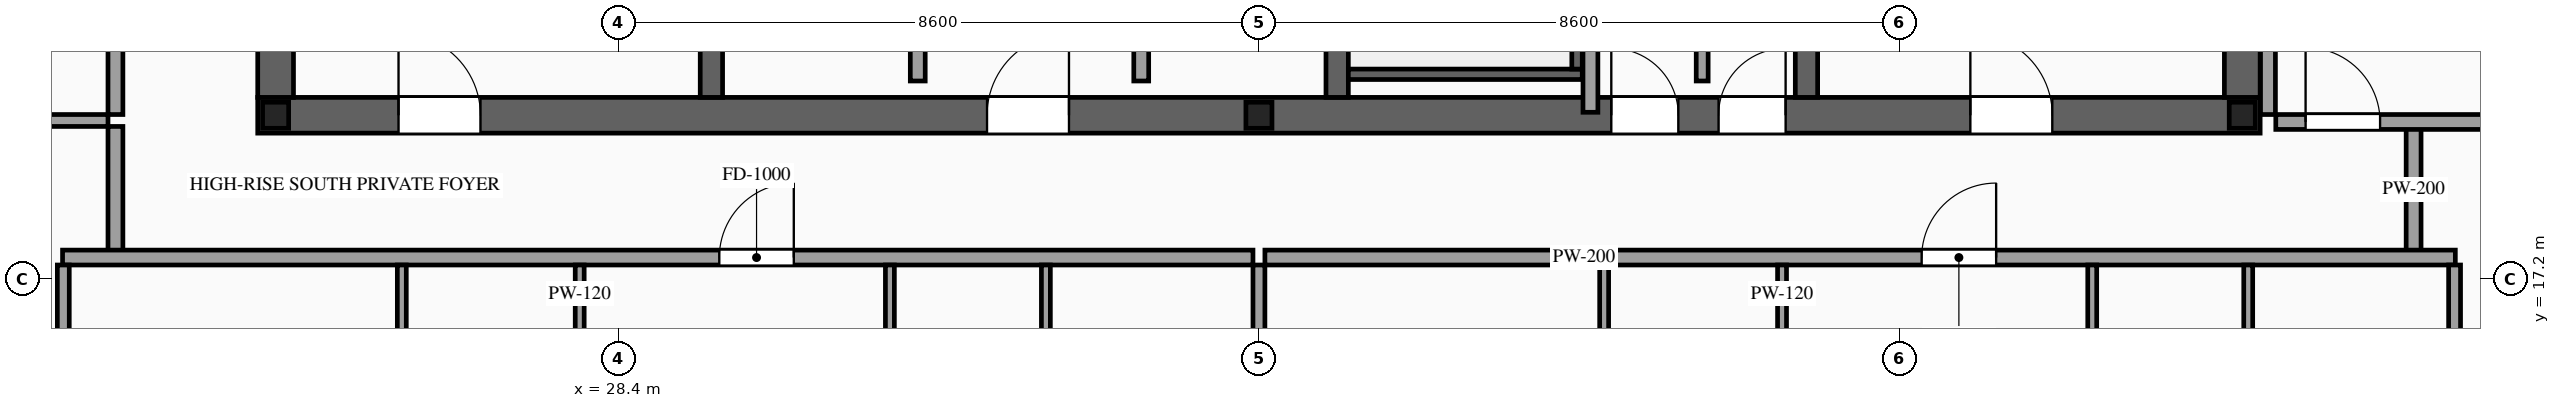
"""IFC4 building model, lengths in metres.
Left out: names, types, materials, properties, quantities, classifications, styles, units other than length and angle.
Written with IfcOpenShell. Run it as: python <this file> out.ifc"""

import sys

from ifc_helpers import new_model, si_unit, direction, frame, frame_2d, origin, origin_2d, place, context, subcontext, project, spatial, rectangle, i_section, extrude, source, transform, mapped, element, fill, save


model = new_model("IFC4")
c1 = context("Model", 3, precision=1e-05, world=origin(), true_north=direction((0.0, 1.0)))
c2 = subcontext(c1, "Body", "Model", "MODEL_VIEW")
j1 = project(units=[si_unit("LENGTHUNIT", "METRE"), si_unit("PLANEANGLEUNIT", "RADIAN")], contexts=[c1])
p1 = place(None, origin())
s1 = spatial("IfcSite", under=j1, at=p1, CompositionType="ELEMENT")
p2 = place(p1, origin())
s2 = spatial("IfcBuilding", under=s1, at=p2, CompositionType="ELEMENT")
p3 = place(p2, frame((0.0, 0.0, 325.2)))
s3 = spatial("IfcBuildingStorey", under=s2, at=p3, CompositionType="ELEMENT", Elevation=325.2)
p4 = place(p3, frame((23.56, 19.4, 0.0), z_axis=(0.0, 0.0, 1.0), x_axis=(1.0, 0.0, 0.0)))
e1 = element("IfcWall", 1, at=p4, inside=s3, PredefinedType="SHEAR", context=c2, shape_type="SweptSolid", body=[
    extrude(rectangle(XDim=26.88, YDim=0.48, at=frame_2d((13.44, 0.0))), origin(), (0.0, 0.0, 1.0), 3.5),
])
p5 = place(p4, frame((1.89, 0.0, 0.0)))
e2 = element("IfcOpeningElement", 2, at=p5, cuts=e1, PredefinedType="OPENING", context=c2, shape_type="SweptSolid", body=[
    extrude(rectangle(XDim=1.1, YDim=2.2, at=frame_2d((0.55, 1.1))), frame((0.0, 0.255, 0.0), z_axis=(0.0, -1.0, 0.0), x_axis=(1.0, 0.0, 0.0)), (0.0, 0.0, 1.0), 0.51),
])
p6 = place(p4, frame((9.79, 0.0, 0.0)))
e3 = element("IfcOpeningElement", 3, at=p6, cuts=e1, PredefinedType="OPENING", context=c2, shape_type="SweptSolid", body=[
    extrude(rectangle(XDim=1.1, YDim=2.2, at=frame_2d((0.55, 1.1))), frame((0.0, 0.255, 0.0), z_axis=(0.0, -1.0, 0.0), x_axis=(1.0, 0.0, 0.0)), (0.0, 0.0, 1.0), 0.51),
])
p7 = place(p4, frame((22.99, 0.0, 0.0)))
e4 = element("IfcOpeningElement", 4, at=p7, cuts=e1, PredefinedType="OPENING", context=c2, shape_type="SweptSolid", body=[
    extrude(rectangle(XDim=1.1, YDim=2.2, at=frame_2d((0.55, 1.1))), frame((0.0, 0.255, 0.0), z_axis=(0.0, -1.0, 0.0), x_axis=(1.0, 0.0, 0.0)), (0.0, 0.0, 1.0), 0.51),
])
p8 = place(p4, frame((19.61, 0.0, 0.0)))
e5 = element("IfcOpeningElement", 5, at=p8, cuts=e1, PredefinedType="OPENING", context=c2, shape_type="SweptSolid", body=[
    extrude(rectangle(XDim=0.9, YDim=2.15, at=frame_2d((0.45, 1.075))), frame((0.0, 0.255, 0.0), z_axis=(0.0, -1.0, 0.0), x_axis=(1.0, 0.0, 0.0)), (0.0, 0.0, 1.0), 0.51),
])
p9 = place(p4, frame((18.17, 0.0, 0.0)))
e6 = element("IfcOpeningElement", 6, at=p9, cuts=e1, PredefinedType="OPENING", context=c2, shape_type="SweptSolid", body=[
    extrude(rectangle(XDim=0.9, YDim=2.15, at=frame_2d((0.45, 1.075))), frame((0.0, 0.255, 0.0), z_axis=(0.0, -1.0, 0.0), x_axis=(1.0, 0.0, 0.0)), (0.0, 0.0, 1.0), 0.51),
])
m1 = source(origin(), c2, "Body", "SweptSolid", [
    extrude(rectangle(XDim=12.32, YDim=0.48, at=frame_2d((6.16, 0.0))), origin(), (0.0, 0.0, 1.0), 3.5),
])
for number, where, z_axis, x_axis in (
    (7, (23.8, 19.64, 0.0), (0.0, 0.0, 1.0), (0.0, 1.0, 0.0)),
    (8, (50.2, 19.64, 0.0), (0.0, 0.0, 1.0), (0.0, 1.0, 0.0)),
):
    element("IfcWall", number, at=place(p3, frame(where, z_axis=z_axis, x_axis=x_axis)), inside=s3, PredefinedType="SHEAR", context=c2, shape_type="MappedRepresentation", body=[
        mapped(m1, transform((0.0, 0.0, 0.0), scale=1.0)),
    ])
m2 = source(origin(), c2, "Body", "SweptSolid", [
    extrude(rectangle(XDim=12.32, YDim=0.3, at=frame_2d((6.16, 0.0))), origin(), (0.0, 0.0, 1.0), 3.5),
])
for number, where, z_axis, x_axis in (
    (9, (29.65, 19.64, 0.0), (0.0, 0.0, 1.0), (0.0, 1.0, 0.0)),
    (10, (38.05, 19.64, 0.0), (0.0, 0.0, 1.0), (0.0, 1.0, 0.0)),
):
    element("IfcWall", number, at=place(p3, frame(where, z_axis=z_axis, x_axis=x_axis)), inside=s3, PredefinedType="SOLIDWALL", context=c2, shape_type="MappedRepresentation", body=[
        mapped(m2, transform((0.0, 0.0, 0.0), scale=1.0)),
    ])
p10 = place(p3, frame((44.35, 19.64, 0.0), z_axis=(0.0, 0.0, 1.0), x_axis=(0.0, 1.0, 0.0)))
e11 = element("IfcWall", 11, at=p10, inside=s3, PredefinedType="SOLIDWALL", context=c2, shape_type="SweptSolid", body=[
    extrude(rectangle(XDim=12.32, YDim=0.3, at=frame_2d((6.16, 0.0))), origin(), (0.0, 0.0, 1.0), 3.5),
])
p11 = place(p10, frame((6.56, 0.0, 0.0)))
e12 = element("IfcOpeningElement", 12, at=p11, cuts=e11, PredefinedType="OPENING", context=c2, shape_type="SweptSolid", body=[
    extrude(rectangle(XDim=1.1, YDim=2.2, at=frame_2d((0.55, 1.1))), frame((0.0, 0.165, 0.0), z_axis=(0.0, -1.0, 0.0), x_axis=(1.0, 0.0, 0.0)), (0.0, 0.0, 1.0), 0.33),
])
p12 = place(p10, frame((8.66, 0.0, 0.0)))
e13 = element("IfcOpeningElement", 13, at=p12, cuts=e11, PredefinedType="OPENING", context=c2, shape_type="SweptSolid", body=[
    extrude(rectangle(XDim=1.1, YDim=2.2, at=frame_2d((0.55, 1.1))), frame((0.0, 0.165, 0.0), z_axis=(0.0, -1.0, 0.0), x_axis=(1.0, 0.0, 0.0)), (0.0, 0.0, 1.0), 0.33),
])
p13 = place(p10, frame((10.76, 0.0, 0.0)))
e14 = element("IfcOpeningElement", 14, at=p13, cuts=e11, PredefinedType="OPENING", context=c2, shape_type="SweptSolid", body=[
    extrude(rectangle(XDim=1.1, YDim=2.2, at=frame_2d((0.55, 1.1))), frame((0.0, 0.165, 0.0), z_axis=(0.0, -1.0, 0.0), x_axis=(1.0, 0.0, 0.0)), (0.0, 0.0, 1.0), 0.33),
])
m3 = source(origin(), c2, "Body", "SweptSolid", [
    extrude(i_section(OverallWidth=0.35, OverallDepth=0.35, WebThickness=0.012, FlangeThickness=0.019, at=origin_2d()), origin(), (0.0, 0.0, 1.0), 3.5),
])
for number, where, z_axis, x_axis in (
    (15, (23.8, 19.4, 0.0), (0.0, 0.0, 1.0), (1.0, 0.0, 0.0)),
    (16, (37.0, 19.4, 0.0), (0.0, 0.0, 1.0), (1.0, 0.0, 0.0)),
    (17, (50.2, 19.4, 0.0), (0.0, 0.0, 1.0), (1.0, 0.0, 0.0)),
):
    element("IfcColumn", number, at=place(p3, frame(where, z_axis=z_axis, x_axis=x_axis)), inside=s3, PredefinedType="COLUMN", context=c2, shape_type="MappedRepresentation", body=[
        mapped(m3, transform((0.0, 0.0, 0.0), scale=1.0)),
    ])
m4 = source(origin(), c2, "Body", "SweptSolid", [
    extrude(rectangle(XDim=3.14, YDim=0.14, at=frame_2d((1.57, 0.0))), origin(), (0.0, 0.0, 1.0), 3.28),
])
p14 = place(p3, frame((38.2, 19.95, 0.0), z_axis=(0.0, 0.0, 1.0), x_axis=(1.0, 0.0, 0.0)))
e18 = element("IfcWall", 18, at=p14, inside=s3, PredefinedType="SOLIDWALL", context=c2, shape_type="MappedRepresentation", body=[
    mapped(m4, transform((0.0, 0.0, 0.0), scale=1.0)),
])
m5 = source(origin(), c2, "Body", "SweptSolid", [
    extrude(rectangle(XDim=8.94, YDim=0.14, at=frame_2d((4.47, 0.0))), origin(), (0.0, 0.0, 1.0), 3.28),
])
p15 = place(p3, frame((41.27, 20.02, 0.0), z_axis=(0.0, 0.0, 1.0), x_axis=(0.0, 1.0, 0.0)))
e19 = element("IfcWall", 19, at=p15, inside=s3, PredefinedType="SOLIDWALL", context=c2, shape_type="MappedRepresentation", body=[
    mapped(m5, transform((0.0, 0.0, 0.0), scale=1.0)),
])
p16 = place(p3, frame((32.42, 19.86, 0.0), z_axis=(0.0, 0.0, 1.0), x_axis=(0.0, 1.0, 0.0)))
e20 = element("IfcWall", 20, at=p16, inside=s3, PredefinedType="PARTITIONING", context=c2, shape_type="SweptSolid", body=[
    extrude(rectangle(XDim=11.88, YDim=0.2, at=frame_2d((5.94, 0.0))), origin(), (0.0, 0.0, 1.0), 3.28),
])
p17 = place(p16, frame((5.49, 0.0, 0.0)))
e21 = element("IfcOpeningElement", 21, at=p17, cuts=e20, PredefinedType="OPENING", context=c2, shape_type="SweptSolid", body=[
    extrude(rectangle(XDim=0.9, YDim=2.15, at=frame_2d((0.45, 1.075))), frame((0.0, 0.115, 0.0), z_axis=(0.0, -1.0, 0.0), x_axis=(1.0, 0.0, 0.0)), (0.0, 0.0, 1.0), 0.23),
])
p18 = place(p3, frame((35.42, 19.86, 0.0), z_axis=(0.0, 0.0, 1.0), x_axis=(0.0, 1.0, 0.0)))
e22 = element("IfcWall", 22, at=p18, inside=s3, PredefinedType="PARTITIONING", context=c2, shape_type="SweptSolid", body=[
    extrude(rectangle(XDim=6.94, YDim=0.2, at=frame_2d((3.47, 0.0))), origin(), (0.0, 0.0, 1.0), 3.28),
])
p19 = place(p18, frame((3.02, 0.0, 0.0)))
e23 = element("IfcOpeningElement", 23, at=p19, cuts=e22, PredefinedType="OPENING", context=c2, shape_type="SweptSolid", body=[
    extrude(rectangle(XDim=0.9, YDim=2.15, at=frame_2d((0.45, 1.075))), frame((0.0, 0.115, 0.0), z_axis=(0.0, -1.0, 0.0), x_axis=(1.0, 0.0, 0.0)), (0.0, 0.0, 1.0), 0.23),
])
m6 = source(origin(), c2, "Body", "SweptSolid", [
    extrude(rectangle(XDim=1.34, YDim=0.16, at=frame_2d((0.67, 0.0))), origin(), (0.0, 0.0, 1.0), 3.28),
])
p20 = place(p3, frame((42.95, 19.86, 0.0), z_axis=(0.0, 0.0, 1.0), x_axis=(0.0, 1.0, 0.0)))
e24 = element("IfcWall", 24, at=p20, inside=s3, PredefinedType="PARTITIONING", context=c2, shape_type="MappedRepresentation", body=[
    mapped(m6, transform((0.0, 0.0, 0.0), scale=1.0)),
])
m7 = source(origin(), c2, "Body", "SweptSolid", [
    extrude(rectangle(XDim=6.06, YDim=0.2, at=frame_2d((3.03, 0.0))), origin(), (0.0, 0.0, 1.0), 3.28),
])
p21 = place(p3, frame((41.45, 19.44, 0.0), z_axis=(0.0, 0.0, 1.0), x_axis=(0.0, 1.0, 0.0)))
e25 = element("IfcWall", 25, at=p21, inside=s3, PredefinedType="PARTITIONING", context=c2, shape_type="MappedRepresentation", body=[
    mapped(m7, transform((0.0, 0.0, 0.0), scale=1.0)),
])
m8 = source(origin(), c2, "Body", "SweptSolid", [
    extrude(rectangle(XDim=1.7, YDim=0.2, at=frame_2d((0.85, 0.0))), origin(), (0.0, 0.0, 1.0), 3.28),
])
for number, where, z_axis, x_axis in (
    (26, (21.65, 17.55, 0.0), (0.0, 0.0, 1.0), (0.0, 1.0, 0.0)),
    (27, (52.5, 17.55, 0.0), (0.0, 0.0, 1.0), (0.0, 1.0, 0.0)),
):
    element("IfcWall", number, at=place(p3, frame(where, z_axis=z_axis, x_axis=x_axis)), inside=s3, PredefinedType="PARTITIONING", context=c2, shape_type="MappedRepresentation", body=[
        mapped(m8, transform((0.0, 0.0, 0.0), scale=1.0)),
    ])
p22 = place(p3, frame((20.94, 17.49, 0.0), z_axis=(0.0, 0.0, 1.0), x_axis=(1.0, 0.0, 0.0)))
e28 = element("IfcWall", 28, at=p22, inside=s3, PredefinedType="PARTITIONING", context=c2, shape_type="SweptSolid", body=[
    extrude(rectangle(XDim=15.98, YDim=0.2, at=frame_2d((7.99, 0.0))), origin(), (0.0, 0.0, 1.0), 3.28),
])
p23 = place(p22, frame((8.816, 0.0, 0.0)))
e29 = element("IfcOpeningElement", 29, at=p23, cuts=e28, PredefinedType="OPENING", context=c2, shape_type="SweptSolid", body=[
    extrude(rectangle(XDim=1.0, YDim=2.2, at=frame_2d((0.5, 1.1))), frame((0.0, 0.115, 0.0), z_axis=(0.0, -1.0, 0.0), x_axis=(1.0, 0.0, 0.0)), (0.0, 0.0, 1.0), 0.23),
])
m9 = source(origin(), c2, "Body", "SweptSolid", [
    extrude(rectangle(XDim=10.54, YDim=0.16, at=frame_2d((5.27, 0.0))), origin(), (0.0, 0.0, 1.0), 2.787),
])
p24 = place(p3, frame((37.0, 6.85, 0.0), z_axis=(0.0, 0.0, 1.0), x_axis=(0.0, 1.0, 0.0)))
e30 = element("IfcWall", 30, at=p24, inside=s3, PredefinedType="PARTITIONING", context=c2, shape_type="MappedRepresentation", body=[
    mapped(m9, transform((0.0, 0.0, 0.0), scale=1.0)),
])
m10 = source(origin(), c2, "Body", "SweptSolid", [
    extrude(rectangle(XDim=2.9, YDim=0.12, at=frame_2d((1.45, 0.0))), origin(), (0.0, 0.0, 1.0), 3.28),
])
p25 = place(p3, frame((25.494, 14.49, 0.0), z_axis=(0.0, 0.0, 1.0), x_axis=(0.0, 1.0, 0.0)))
e31 = element("IfcWall", 31, at=p25, inside=s3, PredefinedType="PARTITIONING", context=c2, shape_type="MappedRepresentation", body=[
    mapped(m10, transform((0.0, 0.0, 0.0), scale=1.0)),
])
p26 = place(p3, frame((27.882, 14.49, 0.0), z_axis=(0.0, 0.0, 1.0), x_axis=(0.0, 1.0, 0.0)))
e32 = element("IfcWall", 32, at=p26, inside=s3, PredefinedType="PARTITIONING", context=c2, shape_type="SweptSolid", body=[
    extrude(rectangle(XDim=2.9, YDim=0.12, at=frame_2d((1.45, 0.0))), origin(), (0.0, 0.0, 1.0), 3.28),
])
p27 = place(p26, frame((1.025, 0.0, 0.0)))
e33 = element("IfcOpeningElement", 33, at=p27, cuts=e32, PredefinedType="OPENING", context=c2, shape_type="SweptSolid", body=[
    extrude(rectangle(XDim=0.85, YDim=2.1, at=frame_2d((0.425, 1.05))), frame((0.0, 0.075, 0.0), z_axis=(0.0, -1.0, 0.0), x_axis=(1.0, 0.0, 0.0)), (0.0, 0.0, 1.0), 0.15),
])
for number, where, z_axis, x_axis in (
    (34, (34.14, 14.49, 0.0), (0.0, 0.0, 1.0), (0.0, 1.0, 0.0)),
    (35, (32.046, 14.49, 0.0), (0.0, 0.0, 1.0), (0.0, 1.0, 0.0)),
):
    element("IfcWall", number, at=place(p3, frame(where, z_axis=z_axis, x_axis=x_axis)), inside=s3, PredefinedType="PARTITIONING", context=c2, shape_type="MappedRepresentation", body=[
        mapped(m10, transform((0.0, 0.0, 0.0), scale=1.0)),
    ])
p28 = place(p3, frame((37.08, 17.49, 0.0), z_axis=(0.0, 0.0, 1.0), x_axis=(1.0, 0.0, 0.0)))
e36 = element("IfcWall", 36, at=p28, inside=s3, PredefinedType="PARTITIONING", context=c2, shape_type="SweptSolid", body=[
    extrude(rectangle(XDim=15.98, YDim=0.2, at=frame_2d((7.99, 0.0))), origin(), (0.0, 0.0, 1.0), 3.28),
])
p29 = place(p28, frame((8.816, 0.0, 0.0)))
e37 = element("IfcOpeningElement", 37, at=p29, cuts=e36, PredefinedType="OPENING", context=c2, shape_type="SweptSolid", body=[
    extrude(rectangle(XDim=1.0, YDim=2.2, at=frame_2d((0.5, 1.1))), frame((0.0, 0.115, 0.0), z_axis=(0.0, -1.0, 0.0), x_axis=(1.0, 0.0, 0.0)), (0.0, 0.0, 1.0), 0.23),
])
m11 = source(origin(), c2, "Body", "SweptSolid", [
    extrude(rectangle(XDim=10.39, YDim=0.16, at=frame_2d((5.195, 0.0))), origin(), (0.0, 0.0, 1.0), 3.28),
])
for number, where, z_axis, x_axis in (
    (38, (20.95, 7.0, 0.0), (0.0, 0.0, 1.0), (0.0, 1.0, 0.0)),
    (39, (53.05, 7.0, 0.0), (0.0, 0.0, 1.0), (0.0, 1.0, 0.0)),
):
    element("IfcWall", number, at=place(p3, frame(where, z_axis=z_axis, x_axis=x_axis)), inside=s3, PredefinedType="PARTITIONING", context=c2, shape_type="MappedRepresentation", body=[
        mapped(m11, transform((0.0, 0.0, 0.0), scale=1.0)),
    ])
p30 = place(p3, frame((41.634, 14.49, 0.0), z_axis=(0.0, 0.0, 1.0), x_axis=(0.0, 1.0, 0.0)))
e40 = element("IfcWall", 40, at=p30, inside=s3, PredefinedType="PARTITIONING", context=c2, shape_type="MappedRepresentation", body=[
    mapped(m10, transform((0.0, 0.0, 0.0), scale=1.0)),
])
p31 = place(p3, frame((44.022, 14.49, 0.0), z_axis=(0.0, 0.0, 1.0), x_axis=(0.0, 1.0, 0.0)))
e41 = element("IfcWall", 41, at=p31, inside=s3, PredefinedType="PARTITIONING", context=c2, shape_type="SweptSolid", body=[
    extrude(rectangle(XDim=2.9, YDim=0.12, at=frame_2d((1.45, 0.0))), origin(), (0.0, 0.0, 1.0), 3.28),
])
p32 = place(p31, frame((1.025, 0.0, 0.0)))
e42 = element("IfcOpeningElement", 42, at=p32, cuts=e41, PredefinedType="OPENING", context=c2, shape_type="SweptSolid", body=[
    extrude(rectangle(XDim=0.85, YDim=2.1, at=frame_2d((0.425, 1.05))), frame((0.0, 0.075, 0.0), z_axis=(0.0, -1.0, 0.0), x_axis=(1.0, 0.0, 0.0)), (0.0, 0.0, 1.0), 0.15),
])
m12 = source(origin(), c2, "Body", "SweptSolid", [
    extrude(rectangle(XDim=2.9, YDim=0.12, at=frame_2d((1.45, 0.0))), origin(), (0.0, 0.0, 1.0), 2.825),
])
p33 = place(p3, frame((50.28, 14.49, 0.0), z_axis=(0.0, 0.0, 1.0), x_axis=(0.0, 1.0, 0.0)))
e43 = element("IfcWall", 43, at=p33, inside=s3, PredefinedType="PARTITIONING", context=c2, shape_type="MappedRepresentation", body=[
    mapped(m12, transform((0.0, 0.0, 0.0), scale=1.0)),
])
p34 = place(p3, frame((48.186, 14.49, 0.0), z_axis=(0.0, 0.0, 1.0), x_axis=(0.0, 1.0, 0.0)))
e44 = element("IfcWall", 44, at=p34, inside=s3, PredefinedType="PARTITIONING", context=c2, shape_type="MappedRepresentation", body=[
    mapped(m10, transform((0.0, 0.0, 0.0), scale=1.0)),
])
p35 = place(p3, frame((21.65, 19.41, 0.0), z_axis=(0.0, 0.0, 1.0), x_axis=(0.0, 1.0, 0.0)))
e45 = element("IfcWall", 45, at=p35, inside=s3, PredefinedType="PARTITIONING", context=c2, shape_type="SweptSolid", body=[
    extrude(rectangle(XDim=12.78, YDim=0.2, at=frame_2d((6.39, 0.0))), origin(), (0.0, 0.0, 1.0), 3.28),
])
p36 = place(p35, frame((5.89, 0.0, 0.0)))
e46 = element("IfcOpeningElement", 46, at=p36, cuts=e45, PredefinedType="OPENING", context=c2, shape_type="SweptSolid", body=[
    extrude(rectangle(XDim=1.0, YDim=2.2, at=frame_2d((0.5, 1.1))), frame((0.0, 0.115, 0.0), z_axis=(0.0, -1.0, 0.0), x_axis=(1.0, 0.0, 0.0)), (0.0, 0.0, 1.0), 0.23),
])
m13 = source(origin(), c2, "Body", "SweptSolid", [
    extrude(rectangle(XDim=3.5, YDim=0.16, at=frame_2d((1.75, 0.0))), origin(), (0.0, 0.0, 1.0), 2.825),
])
p37 = place(p3, frame((18.05, 19.33, 0.0), z_axis=(0.0, 0.0, 1.0), x_axis=(1.0, 0.0, 0.0)))
e47 = element("IfcWall", 47, at=p37, inside=s3, PredefinedType="PARTITIONING", context=c2, shape_type="MappedRepresentation", body=[
    mapped(m13, transform((0.0, 0.0, 0.0), scale=1.0)),
])
p38 = place(p3, frame((50.65, 19.31, 0.0), z_axis=(0.0, 0.0, 1.0), x_axis=(1.0, 0.0, 0.0)))
e48 = element("IfcWall", 48, at=p38, inside=s3, PredefinedType="PARTITIONING", context=c2, shape_type="SweptSolid", body=[
    extrude(rectangle(XDim=5.3, YDim=0.2, at=frame_2d((2.65, 0.0))), origin(), (0.0, 0.0, 1.0), 2.825),
])
p39 = place(p38, frame((0.4, 0.0, 0.0)))
e49 = element("IfcOpeningElement", 49, at=p39, cuts=e48, PredefinedType="OPENING", context=c2, shape_type="SweptSolid", body=[
    extrude(rectangle(XDim=1.0, YDim=2.2, at=frame_2d((0.5, 1.1))), frame((0.0, 0.115, 0.0), z_axis=(0.0, -1.0, 0.0), x_axis=(1.0, 0.0, 0.0)), (0.0, 0.0, 1.0), 0.23),
])
m14 = source(origin(), c2, "Body", "SweptSolid", [
    extrude(rectangle(XDim=12.78, YDim=0.2, at=frame_2d((6.39, 0.0))), origin(), (0.0, 0.0, 1.0), 3.28),
])
p40 = place(p3, frame((50.545, 19.41, 0.0), z_axis=(0.0, 0.0, 1.0), x_axis=(0.0, 1.0, 0.0)))
e50 = element("IfcWall", 50, at=p40, inside=s3, PredefinedType="PARTITIONING", context=c2, shape_type="MappedRepresentation", body=[
    mapped(m14, transform((0.0, 0.0, 0.0), scale=1.0)),
])
m15 = source(origin(), c2, "Body", "SweptSolid", [
    extrude(rectangle(XDim=1.1, YDim=2.2, at=frame_2d((0.55, 1.1))), frame((0.0, 0.025, 0.0), z_axis=(0.0, -1.0, 0.0), x_axis=(1.0, 0.0, 0.0)), (0.0, 0.0, 1.0), 0.05),
])
p41 = place(p5, origin())
e51 = element("IfcDoor", 51, at=p41, inside=s3, OperationType="SINGLE_SWING_LEFT", PredefinedType="DOOR", context=c2, shape_type="MappedRepresentation", body=[
    mapped(m15, transform((0.0, 0.0, 0.0), scale=1.0)),
])
fill(e2, e51)
p42 = place(p6, origin())
e52 = element("IfcDoor", 52, at=p42, inside=s3, OperationType="SINGLE_SWING_RIGHT", PredefinedType="DOOR", context=c2, shape_type="MappedRepresentation", body=[
    mapped(m15, transform((0.0, 0.0, 0.0), scale=1.0)),
])
fill(e3, e52)
p43 = place(p7, origin())
e53 = element("IfcDoor", 53, at=p43, inside=s3, OperationType="SINGLE_SWING_LEFT", PredefinedType="DOOR", context=c2, shape_type="MappedRepresentation", body=[
    mapped(m15, transform((0.0, 0.0, 0.0), scale=1.0)),
])
fill(e4, e53)
m16 = source(origin(), c2, "Body", "SweptSolid", [
    extrude(rectangle(XDim=0.9, YDim=2.15, at=frame_2d((0.45, 1.075))), frame((0.0, 0.025, 0.0), z_axis=(0.0, -1.0, 0.0), x_axis=(1.0, 0.0, 0.0)), (0.0, 0.0, 1.0), 0.05),
])
p44 = place(p8, origin())
e54 = element("IfcDoor", 54, at=p44, inside=s3, OperationType="SINGLE_SWING_RIGHT", PredefinedType="DOOR", context=c2, shape_type="MappedRepresentation", body=[
    mapped(m16, transform((0.0, 0.0, 0.0), scale=1.0)),
])
fill(e5, e54)
p45 = place(p9, origin())
e55 = element("IfcDoor", 55, at=p45, inside=s3, OperationType="SINGLE_SWING_LEFT", PredefinedType="DOOR", context=c2, shape_type="MappedRepresentation", body=[
    mapped(m16, transform((0.0, 0.0, 0.0), scale=1.0)),
])
fill(e6, e55)
m17 = source(origin(), c2, "Body", "SweptSolid", [
    extrude(rectangle(XDim=1.0, YDim=2.2, at=frame_2d((0.5, 1.1))), frame((0.0, 0.025, 0.0), z_axis=(0.0, -1.0, 0.0), x_axis=(1.0, 0.0, 0.0)), (0.0, 0.0, 1.0), 0.05),
])
p46 = place(p23, origin())
e56 = element("IfcDoor", 56, at=p46, inside=s3, OperationType="SINGLE_SWING_RIGHT", PredefinedType="DOOR", context=c2, shape_type="MappedRepresentation", body=[
    mapped(m17, transform((0.0, 0.0, 0.0), scale=1.0)),
])
fill(e29, e56)
p47 = place(p29, origin())
e57 = element("IfcDoor", 57, at=p47, inside=s3, OperationType="SINGLE_SWING_RIGHT", PredefinedType="DOOR", context=c2, shape_type="MappedRepresentation", body=[
    mapped(m17, transform((0.0, 0.0, 0.0), scale=1.0)),
])
fill(e37, e57)
p48 = place(p39, origin())
e58 = element("IfcDoor", 58, at=p48, inside=s3, OperationType="SINGLE_SWING_LEFT", PredefinedType="DOOR", context=c2, shape_type="MappedRepresentation", body=[
    mapped(m17, transform((0.0, 0.0, 0.0), scale=1.0)),
])
fill(e49, e58)
save(model, sys.argv[1])
